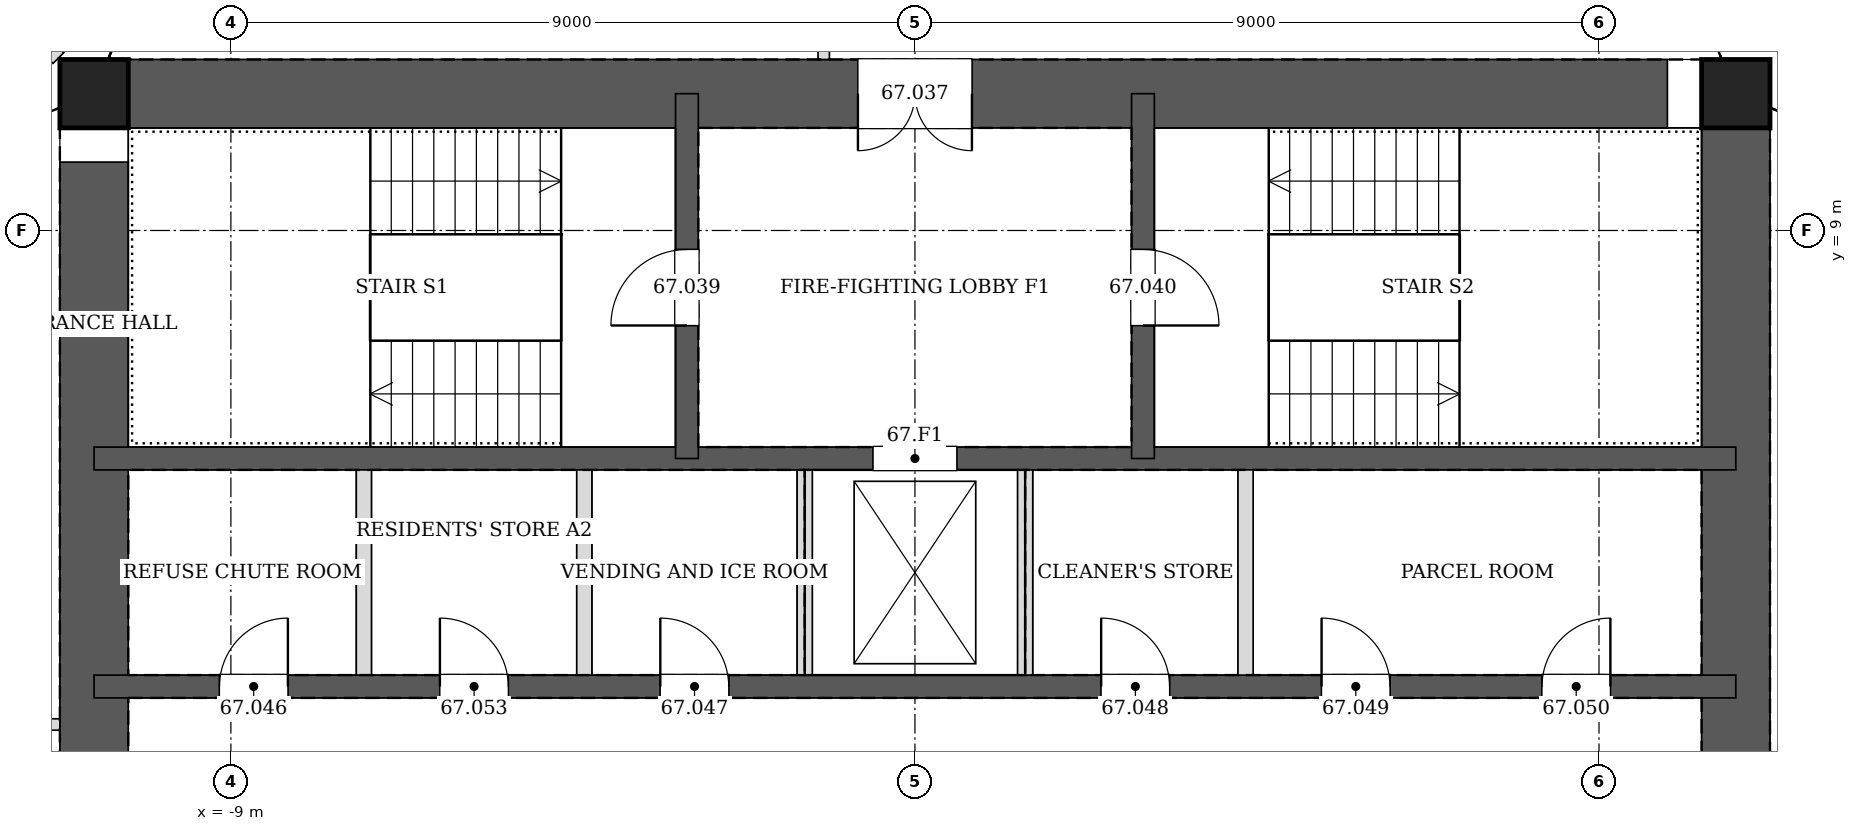
"""IFC4 building model, lengths in metres.
Left out: names, types, materials, properties, quantities, classifications, styles, units other than length and angle.
Written with IfcOpenShell. Run it as: python <this file> out.ifc"""

import sys

from ifc_helpers import new_model, si_unit, direction, frame, frame_2d, origin, origin_2d, place, context, subcontext, project, spatial, rectangle, hollow_rectangle, extrude, element, fill, save


model = new_model("IFC4")
c1 = context("Model", 3, precision=1e-05, world=origin(), true_north=direction((0.0, 1.0)))
c2 = subcontext(c1, "Body", "Model", "MODEL_VIEW")
j1 = project(units=[si_unit("LENGTHUNIT", "METRE"), si_unit("PLANEANGLEUNIT", "RADIAN")], contexts=[c1])
p1 = place(None, origin())
s1 = spatial("IfcSite", under=j1, at=p1, CompositionType="ELEMENT")
p2 = place(p1, origin())
s2 = spatial("IfcBuilding", under=s1, at=p2, CompositionType="ELEMENT")
p3 = place(p2, frame((0.0, 0.0, 277.6)))
s3 = spatial("IfcBuildingStorey", under=s2, at=p3, CompositionType="ELEMENT", Elevation=277.6)
for number, where, z_axis, x_axis in (
    (1, (10.8, 10.8, 0.0), (0.0, 0.0, 1.0), (1.0, 0.0, 0.0)),
    (2, (-10.8, 10.8, 0.0), (0.0, 0.0, 1.0), (1.0, 0.0, 0.0)),
):
    element("IfcColumn", number, at=place(p3, frame(where, z_axis=z_axis, x_axis=x_axis)), inside=s3, PredefinedType="COLUMN", context=c2, shape_type="SweptSolid", body=[
        extrude(hollow_rectangle(XDim=0.9, YDim=0.9, WallThickness=0.04, at=origin_2d()), origin(), (0.0, 0.0, 1.0), 3.4),
    ])
p4 = place(p3, frame((10.8, -10.8, 0.0), z_axis=(0.0, 0.0, 1.0), x_axis=(0.0, 1.0, 0.0)))
e3 = element("IfcWall", 3, at=p4, inside=s3, PredefinedType="SOLIDWALL", context=c2, shape_type="SweptSolid", body=[
    extrude(rectangle(XDim=21.6, YDim=0.9, at=frame_2d((10.8, 0.0))), origin(), (0.0, 0.0, 1.0), 3.4),
])
p5 = place(p4, frame((11.7, 0.0, 0.0)))
e4 = element("IfcOpeningElement", 4, at=p5, cuts=e3, PredefinedType="OPENING", context=c2, shape_type="SweptSolid", body=[
    extrude(rectangle(XDim=1.2, YDim=2.1, at=frame_2d((0.6, 1.05))), frame((0.0, 0.46, 0.0), z_axis=(0.0, -1.0, 0.0), x_axis=(1.0, 0.0, 0.0)), (0.0, 0.0, 1.0), 0.92),
])
p6 = place(p4, frame((8.7, 0.0, 0.0)))
e5 = element("IfcOpeningElement", 5, at=p6, cuts=e3, PredefinedType="OPENING", context=c2, shape_type="SweptSolid", body=[
    extrude(rectangle(XDim=1.2, YDim=2.1, at=frame_2d((0.6, 1.05))), frame((0.0, 0.46, 0.0), z_axis=(0.0, -1.0, 0.0), x_axis=(1.0, 0.0, 0.0)), (0.0, 0.0, 1.0), 0.92),
])
p7 = place(p3, frame((10.8, 10.8, 0.0), z_axis=(0.0, 0.0, 1.0), x_axis=(-1.0, 0.0, 0.0)))
e6 = element("IfcWall", 6, at=p7, inside=s3, PredefinedType="SOLIDWALL", context=c2, shape_type="SweptSolid", body=[
    extrude(rectangle(XDim=21.6, YDim=0.9, at=frame_2d((10.8, 0.0))), origin(), (0.0, 0.0, 1.0), 3.4),
])
p8 = place(p7, frame((10.05, 0.0, 0.0)))
e7 = element("IfcOpeningElement", 7, at=p8, cuts=e6, PredefinedType="OPENING", context=c2, shape_type="SweptSolid", body=[
    extrude(rectangle(XDim=1.5, YDim=2.1, at=frame_2d((0.75, 1.05))), frame((0.0, 0.46, 0.0), z_axis=(0.0, -1.0, 0.0), x_axis=(1.0, 0.0, 0.0)), (0.0, 0.0, 1.0), 0.92),
])
p9 = place(p3, frame((-10.8, 10.8, 0.0), z_axis=(0.0, 0.0, 1.0), x_axis=(0.0, -1.0, 0.0)))
e8 = element("IfcWall", 8, at=p9, inside=s3, PredefinedType="SOLIDWALL", context=c2, shape_type="SweptSolid", body=[
    extrude(rectangle(XDim=21.6, YDim=0.9, at=frame_2d((10.8, 0.0))), origin(), (0.0, 0.0, 1.0), 3.4),
])
p10 = place(p9, frame((8.7, 0.0, 0.0)))
e9 = element("IfcOpeningElement", 9, at=p10, cuts=e8, PredefinedType="OPENING", context=c2, shape_type="SweptSolid", body=[
    extrude(rectangle(XDim=1.2, YDim=2.1, at=frame_2d((0.6, 1.05))), frame((0.0, 0.46, 0.0), z_axis=(0.0, -1.0, 0.0), x_axis=(1.0, 0.0, 0.0)), (0.0, 0.0, 1.0), 0.92),
])
p11 = place(p9, frame((11.7, 0.0, 0.0)))
e10 = element("IfcOpeningElement", 10, at=p11, cuts=e8, PredefinedType="OPENING", context=c2, shape_type="SweptSolid", body=[
    extrude(rectangle(XDim=1.2, YDim=2.1, at=frame_2d((0.6, 1.05))), frame((0.0, 0.46, 0.0), z_axis=(0.0, -1.0, 0.0), x_axis=(1.0, 0.0, 0.0)), (0.0, 0.0, 1.0), 0.92),
])
p12 = place(p3, frame((-10.8, 3.0, 0.0), z_axis=(0.0, 0.0, 1.0), x_axis=(1.0, 0.0, 0.0)))
e11 = element("IfcWall", 11, at=p12, inside=s3, PredefinedType="SOLIDWALL", context=c2, shape_type="SweptSolid", body=[
    extrude(rectangle(XDim=21.6, YDim=0.3, at=frame_2d((10.8, 0.0))), origin(), (0.0, 0.0, 1.0), 3.4),
])
p13 = place(p12, frame((1.65, 0.0, 0.0)))
e12 = element("IfcOpeningElement", 12, at=p13, cuts=e11, PredefinedType="OPENING", context=c2, shape_type="SweptSolid", body=[
    extrude(rectangle(XDim=0.9, YDim=2.1, at=frame_2d((0.45, 1.05))), frame((0.0, 0.16, 0.0), z_axis=(0.0, -1.0, 0.0), x_axis=(1.0, 0.0, 0.0)), (0.0, 0.0, 1.0), 0.32),
])
p14 = place(p12, frame((7.45, 0.0, 0.0)))
e13 = element("IfcOpeningElement", 13, at=p14, cuts=e11, PredefinedType="OPENING", context=c2, shape_type="SweptSolid", body=[
    extrude(rectangle(XDim=0.9, YDim=2.1, at=frame_2d((0.45, 1.05))), frame((0.0, 0.16, 0.0), z_axis=(0.0, -1.0, 0.0), x_axis=(1.0, 0.0, 0.0)), (0.0, 0.0, 1.0), 0.32),
])
p15 = place(p12, frame((13.25, 0.0, 0.0)))
e14 = element("IfcOpeningElement", 14, at=p15, cuts=e11, PredefinedType="OPENING", context=c2, shape_type="SweptSolid", body=[
    extrude(rectangle(XDim=0.9, YDim=2.1, at=frame_2d((0.45, 1.05))), frame((0.0, 0.16, 0.0), z_axis=(0.0, -1.0, 0.0), x_axis=(1.0, 0.0, 0.0)), (0.0, 0.0, 1.0), 0.32),
])
p16 = place(p12, frame((16.15, 0.0, 0.0)))
e15 = element("IfcOpeningElement", 15, at=p16, cuts=e11, PredefinedType="OPENING", context=c2, shape_type="SweptSolid", body=[
    extrude(rectangle(XDim=0.9, YDim=2.1, at=frame_2d((0.45, 1.05))), frame((0.0, 0.16, 0.0), z_axis=(0.0, -1.0, 0.0), x_axis=(1.0, 0.0, 0.0)), (0.0, 0.0, 1.0), 0.32),
])
p17 = place(p12, frame((19.05, 0.0, 0.0)))
e16 = element("IfcOpeningElement", 16, at=p17, cuts=e11, PredefinedType="OPENING", context=c2, shape_type="SweptSolid", body=[
    extrude(rectangle(XDim=0.9, YDim=2.1, at=frame_2d((0.45, 1.05))), frame((0.0, 0.16, 0.0), z_axis=(0.0, -1.0, 0.0), x_axis=(1.0, 0.0, 0.0)), (0.0, 0.0, 1.0), 0.32),
])
p18 = place(p12, frame((4.55, 0.0, 0.0)))
e17 = element("IfcOpeningElement", 17, at=p18, cuts=e11, PredefinedType="OPENING", context=c2, shape_type="SweptSolid", body=[
    extrude(rectangle(XDim=0.9, YDim=2.1, at=frame_2d((0.45, 1.05))), frame((0.0, 0.16, 0.0), z_axis=(0.0, -1.0, 0.0), x_axis=(1.0, 0.0, 0.0)), (0.0, 0.0, 1.0), 0.32),
])
p19 = place(p3, frame((-10.8, 6.0, 0.0), z_axis=(0.0, 0.0, 1.0), x_axis=(1.0, 0.0, 0.0)))
e18 = element("IfcWall", 18, at=p19, inside=s3, PredefinedType="SOLIDWALL", context=c2, shape_type="SweptSolid", body=[
    extrude(rectangle(XDim=21.6, YDim=0.3, at=frame_2d((10.8, 0.0))), origin(), (0.0, 0.0, 1.0), 3.4),
])
p20 = place(p19, frame((10.25, 0.0, 0.0)))
e19 = element("IfcOpeningElement", 19, at=p20, cuts=e18, PredefinedType="OPENING", context=c2, shape_type="SweptSolid", body=[
    extrude(rectangle(XDim=1.1, YDim=2.1, at=frame_2d((0.55, 1.05))), frame((0.0, 0.16, 0.0), z_axis=(0.0, -1.0, 0.0), x_axis=(1.0, 0.0, 0.0)), (0.0, 0.0, 1.0), 0.32),
])
p21 = place(p3, frame((-3.0, 6.0, 0.0), z_axis=(0.0, 0.0, 1.0), x_axis=(0.0, 1.0, 0.0)))
e20 = element("IfcWall", 20, at=p21, inside=s3, PredefinedType="SOLIDWALL", context=c2, shape_type="SweptSolid", body=[
    extrude(rectangle(XDim=4.8, YDim=0.3, at=frame_2d((2.4, 0.0))), origin(), (0.0, 0.0, 1.0), 3.4),
])
p22 = place(p21, frame((1.75, 0.0, 0.0)))
e21 = element("IfcOpeningElement", 21, at=p22, cuts=e20, PredefinedType="OPENING", context=c2, shape_type="SweptSolid", body=[
    extrude(rectangle(XDim=1.0, YDim=2.1, at=frame_2d((0.5, 1.05))), frame((0.0, 0.16, 0.0), z_axis=(0.0, -1.0, 0.0), x_axis=(1.0, 0.0, 0.0)), (0.0, 0.0, 1.0), 0.32),
])
p23 = place(p3, frame((3.0, 6.0, 0.0), z_axis=(0.0, 0.0, 1.0), x_axis=(0.0, 1.0, 0.0)))
e22 = element("IfcWall", 22, at=p23, inside=s3, PredefinedType="SOLIDWALL", context=c2, shape_type="SweptSolid", body=[
    extrude(rectangle(XDim=4.8, YDim=0.3, at=frame_2d((2.4, 0.0))), origin(), (0.0, 0.0, 1.0), 3.4),
])
p24 = place(p23, frame((1.75, 0.0, 0.0)))
e23 = element("IfcOpeningElement", 23, at=p24, cuts=e22, PredefinedType="OPENING", context=c2, shape_type="SweptSolid", body=[
    extrude(rectangle(XDim=1.0, YDim=2.1, at=frame_2d((0.5, 1.05))), frame((0.0, 0.16, 0.0), z_axis=(0.0, -1.0, 0.0), x_axis=(1.0, 0.0, 0.0)), (0.0, 0.0, 1.0), 0.32),
])
p25 = place(p3, frame((-1.2, 13.05, 0.0), z_axis=(0.0, 0.0, 1.0), x_axis=(0.0, -1.0, 0.0)))
e24 = element("IfcWall", 24, at=p25, inside=s3, PredefinedType="PARTITIONING", context=c2, shape_type="SweptSolid", body=[
    extrude(rectangle(XDim=1.8, YDim=0.15, at=frame_2d((0.9, 0.0))), origin(), (0.0, 0.0, 1.0), 3.2),
])
p26 = place(p25, frame((0.425, 0.0, 0.0)))
e25 = element("IfcOpeningElement", 25, at=p26, cuts=e24, PredefinedType="OPENING", context=c2, shape_type="SweptSolid", body=[
    extrude(rectangle(XDim=0.95, YDim=2.1, at=frame_2d((0.475, 1.05))), frame((0.0, 0.085, 0.0), z_axis=(0.0, -1.0, 0.0), x_axis=(1.0, 0.0, 0.0)), (0.0, 0.0, 1.0), 0.17),
])
p27 = place(p3, frame((-11.25, 2.5, 0.0), z_axis=(0.0, 0.0, 1.0), x_axis=(-1.0, 0.0, 0.0)))
e26 = element("IfcWall", 26, at=p27, inside=s3, PredefinedType="PARTITIONING", context=c2, shape_type="SweptSolid", body=[
    extrude(rectangle(XDim=1.8, YDim=0.15, at=frame_2d((0.9, 0.0))), origin(), (0.0, 0.0, 1.0), 3.2),
])
p28 = place(p27, frame((0.425, 0.0, 0.0)))
e27 = element("IfcOpeningElement", 27, at=p28, cuts=e26, PredefinedType="OPENING", context=c2, shape_type="SweptSolid", body=[
    extrude(rectangle(XDim=0.95, YDim=2.1, at=frame_2d((0.475, 1.05))), frame((0.0, 0.085, 0.0), z_axis=(0.0, -1.0, 0.0), x_axis=(1.0, 0.0, 0.0)), (0.0, 0.0, 1.0), 0.17),
])
p29 = place(p3, frame((-13.45, 13.45, 0.0), z_axis=(0.0, 0.0, 1.0), x_axis=(0.707106781187, -0.707106781187, 0.0)))
e28 = element("IfcWall", 28, at=p29, inside=s3, PredefinedType="PARTITIONING", context=c2, shape_type="SweptSolid", body=[
    extrude(rectangle(XDim=3.085, YDim=0.2, at=frame_2d((1.542, 0.0))), origin(), (0.0, 0.0, 1.0), 2.591),
])
for number, where, z_axis, x_axis in (
    (29, (-7.25, 3.15, 0.0), (0.0, 0.0, 1.0), (0.0, 1.0, 0.0)),
    (30, (-4.35, 3.15, 0.0), (0.0, 0.0, 1.0), (0.0, 1.0, 0.0)),
    (31, (-1.45, 3.15, 0.0), (0.0, 0.0, 1.0), (0.0, 1.0, 0.0)),
    (32, (1.45, 3.15, 0.0), (0.0, 0.0, 1.0), (0.0, 1.0, 0.0)),
    (33, (4.35, 3.15, 0.0), (0.0, 0.0, 1.0), (0.0, 1.0, 0.0)),
):
    element("IfcWall", number, at=place(p3, frame(where, z_axis=z_axis, x_axis=x_axis)), inside=s3, PredefinedType="PARTITIONING", context=c2, shape_type="SweptSolid", body=[
        extrude(rectangle(XDim=2.7, YDim=0.2, at=frame_2d((1.35, 0.0))), origin(), (0.0, 0.0, 1.0), 3.2),
    ])
p30 = place(p8, origin())
e34 = element("IfcDoor", 34, at=p30, inside=s3, OperationType="DOUBLE_DOOR_SINGLE_SWING", PredefinedType="DOOR", context=c2, shape_type="SweptSolid", body=[
    extrude(rectangle(XDim=1.5, YDim=2.1, at=frame_2d((0.75, 1.05))), frame((0.0, 0.025, 0.0), z_axis=(0.0, -1.0, 0.0), x_axis=(1.0, 0.0, 0.0)), (0.0, 0.0, 1.0), 0.05),
])
fill(e7, e34)
p31 = place(p22, origin())
e35 = element("IfcDoor", 35, at=p31, inside=s3, OperationType="SINGLE_SWING_LEFT", PredefinedType="DOOR", context=c2, shape_type="SweptSolid", body=[
    extrude(rectangle(XDim=1.0, YDim=2.1, at=frame_2d((0.5, 1.05))), frame((0.0, 0.025, 0.0), z_axis=(0.0, -1.0, 0.0), x_axis=(1.0, 0.0, 0.0)), (0.0, 0.0, 1.0), 0.05),
])
fill(e21, e35)
p32 = place(p24, frame((1.0, 0.0, 0.0), z_axis=(0.0, 0.0, 1.0), x_axis=(-1.0, 0.0, 0.0)))
e36 = element("IfcDoor", 36, at=p32, inside=s3, OperationType="SINGLE_SWING_RIGHT", PredefinedType="DOOR", context=c2, shape_type="SweptSolid", body=[
    extrude(rectangle(XDim=1.0, YDim=2.1, at=frame_2d((0.5, 1.05))), frame((0.0, 0.025, 0.0), z_axis=(0.0, -1.0, 0.0), x_axis=(1.0, 0.0, 0.0)), (0.0, 0.0, 1.0), 0.05),
])
fill(e23, e36)
p33 = place(p13, origin())
e37 = element("IfcDoor", 37, at=p33, inside=s3, OperationType="SINGLE_SWING_RIGHT", PredefinedType="DOOR", context=c2, shape_type="SweptSolid", body=[
    extrude(rectangle(XDim=0.9, YDim=2.1, at=frame_2d((0.45, 1.05))), frame((0.0, 0.025, 0.0), z_axis=(0.0, -1.0, 0.0), x_axis=(1.0, 0.0, 0.0)), (0.0, 0.0, 1.0), 0.05),
])
fill(e12, e37)
p34 = place(p14, origin())
e38 = element("IfcDoor", 38, at=p34, inside=s3, OperationType="SINGLE_SWING_LEFT", PredefinedType="DOOR", context=c2, shape_type="SweptSolid", body=[
    extrude(rectangle(XDim=0.9, YDim=2.1, at=frame_2d((0.45, 1.05))), frame((0.0, 0.025, 0.0), z_axis=(0.0, -1.0, 0.0), x_axis=(1.0, 0.0, 0.0)), (0.0, 0.0, 1.0), 0.05),
])
fill(e13, e38)
p35 = place(p15, origin())
e39 = element("IfcDoor", 39, at=p35, inside=s3, OperationType="SINGLE_SWING_LEFT", PredefinedType="DOOR", context=c2, shape_type="SweptSolid", body=[
    extrude(rectangle(XDim=0.9, YDim=2.1, at=frame_2d((0.45, 1.05))), frame((0.0, 0.025, 0.0), z_axis=(0.0, -1.0, 0.0), x_axis=(1.0, 0.0, 0.0)), (0.0, 0.0, 1.0), 0.05),
])
fill(e14, e39)
p36 = place(p16, origin())
e40 = element("IfcDoor", 40, at=p36, inside=s3, OperationType="SINGLE_SWING_LEFT", PredefinedType="DOOR", context=c2, shape_type="SweptSolid", body=[
    extrude(rectangle(XDim=0.9, YDim=2.1, at=frame_2d((0.45, 1.05))), frame((0.0, 0.025, 0.0), z_axis=(0.0, -1.0, 0.0), x_axis=(1.0, 0.0, 0.0)), (0.0, 0.0, 1.0), 0.05),
])
fill(e15, e40)
p37 = place(p17, origin())
e41 = element("IfcDoor", 41, at=p37, inside=s3, OperationType="SINGLE_SWING_RIGHT", PredefinedType="DOOR", context=c2, shape_type="SweptSolid", body=[
    extrude(rectangle(XDim=0.9, YDim=2.1, at=frame_2d((0.45, 1.05))), frame((0.0, 0.025, 0.0), z_axis=(0.0, -1.0, 0.0), x_axis=(1.0, 0.0, 0.0)), (0.0, 0.0, 1.0), 0.05),
])
fill(e16, e41)
p38 = place(p18, origin())
e42 = element("IfcDoor", 42, at=p38, inside=s3, OperationType="SINGLE_SWING_LEFT", PredefinedType="DOOR", context=c2, shape_type="SweptSolid", body=[
    extrude(rectangle(XDim=0.9, YDim=2.1, at=frame_2d((0.45, 1.05))), frame((0.0, 0.025, 0.0), z_axis=(0.0, -1.0, 0.0), x_axis=(1.0, 0.0, 0.0)), (0.0, 0.0, 1.0), 0.05),
])
fill(e17, e42)
p39 = place(p20, origin())
e43 = element("IfcDoor", 43, at=p39, inside=s3, OperationType="DOUBLE_DOOR_SLIDING", PredefinedType="DOOR", context=c2, shape_type="SweptSolid", body=[
    extrude(rectangle(XDim=1.1, YDim=2.1, at=frame_2d((0.55, 1.05))), frame((0.0, 0.025, 0.0), z_axis=(0.0, -1.0, 0.0), x_axis=(1.0, 0.0, 0.0)), (0.0, 0.0, 1.0), 0.05),
])
fill(e19, e43)
save(model, sys.argv[1])
